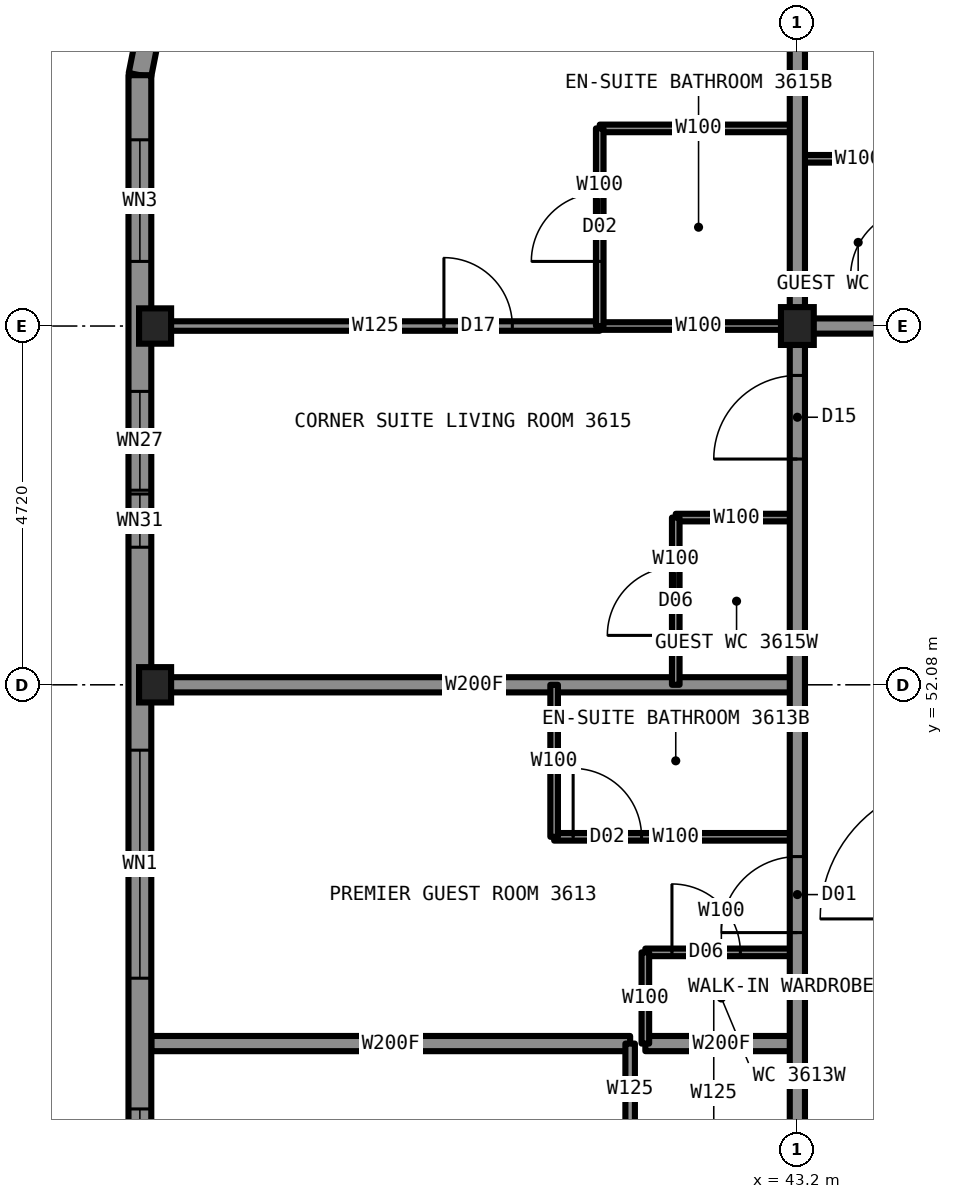
"""IFC4 building model, lengths in metres.
Left out: names, types, materials, properties, quantities, classifications, styles, units other than length and angle.
Written with IfcOpenShell. Run it as: python <this file> out.ifc"""

import sys

from ifc_helpers import new_model, si_unit, direction, frame, frame_2d, origin, origin_2d, place, context, subcontext, project, spatial, rectangle, i_section, extrude, element, fill, save


model = new_model("IFC4")
c1 = context("Model", 3, precision=1e-05, world=origin(), true_north=direction((0.0, 1.0)))
c2 = subcontext(c1, "Body", "Model", "MODEL_VIEW")
j1 = project(units=[si_unit("LENGTHUNIT", "METRE"), si_unit("PLANEANGLEUNIT", "RADIAN")], contexts=[c1])
p1 = place(None, origin())
s1 = spatial("IfcSite", under=j1, at=p1, CompositionType="ELEMENT")
p2 = place(p1, origin())
s2 = spatial("IfcBuilding", under=s1, at=p2, CompositionType="ELEMENT")
p3 = place(p2, frame((0.0, 0.0, 135.4)))
s3 = spatial("IfcBuildingStorey", under=s2, at=p3, CompositionType="ELEMENT", Elevation=135.4)
for number, where, z_axis, x_axis in (
    (1, (34.75, 52.08, 0.0), (0.0, 0.0, 1.0), (1.0, 0.0, 0.0)),
    (2, (34.75, 56.8, 0.0), (0.0, 0.0, 1.0), (1.0, 0.0, 0.0)),
):
    element("IfcColumn", number, at=place(p3, frame(where, z_axis=z_axis, x_axis=x_axis)), inside=s3, PredefinedType="COLUMN", context=c2, shape_type="SweptSolid", body=[
        extrude(i_section(OverallWidth=0.422, OverallDepth=0.465, WebThickness=0.045, FlangeThickness=0.073, at=origin_2d()), origin(), (0.0, 0.0, 1.0), 3.5),
    ])
p4 = place(p3, frame((43.2, 56.8, 0.0), z_axis=(0.0, 0.0, 1.0), x_axis=(1.0, 0.0, 0.0)))
e3 = element("IfcColumn", 3, at=p4, inside=s3, PredefinedType="COLUMN", context=c2, shape_type="SweptSolid", body=[
    extrude(i_section(OverallWidth=0.432, OverallDepth=0.498, WebThickness=0.056, FlangeThickness=0.089, at=origin_2d()), origin(), (0.0, 0.0, 1.0), 3.5),
])
p5 = place(p3, frame((40.6, 56.8, 0.0), z_axis=(0.0, 0.0, 1.0), x_axis=(1.0, 0.0, 0.0)))
e4 = element("IfcWall", 4, at=p5, inside=s3, PredefinedType="PARTITIONING", context=c2, shape_type="SweptSolid", body=[
    extrude(rectangle(XDim=2.6, YDim=0.1, at=frame_2d((1.3, 0.0))), origin(), (0.0, 0.0, 1.0), 2.573),
])
p6 = place(p3, frame((43.2, 56.8, 0.0), z_axis=(0.0, 0.0, 1.0), x_axis=(1.0, 0.0, 0.0)))
e5 = element("IfcWall", 5, at=p6, inside=s3, PredefinedType="PARTITIONING", context=c2, shape_type="SweptSolid", body=[
    extrude(rectangle(XDim=23.6, YDim=0.2, at=frame_2d((11.8, 0.0))), origin(), (0.0, 0.0, 1.0), 3.33),
])
p7 = place(p6, frame((1.85, 0.0, 0.0)))
e6 = element("IfcOpeningElement", 6, at=p7, cuts=e5, PredefinedType="OPENING", context=c2, shape_type="SweptSolid", body=[
    extrude(rectangle(XDim=1.1, YDim=2.2, at=frame_2d((0.55, 1.1))), frame((0.0, 0.11, 0.0), z_axis=(0.0, -1.0, 0.0), x_axis=(1.0, 0.0, 0.0)), (0.0, 0.0, 1.0), 0.22),
])
p8 = place(p6, frame((14.56, 0.0, 0.0)))
e7 = element("IfcOpeningElement", 7, at=p8, cuts=e5, PredefinedType="OPENING", context=c2, shape_type="SweptSolid", body=[
    extrude(rectangle(XDim=1.0, YDim=2.2, at=frame_2d((0.5, 1.1))), frame((0.0, 0.11, 0.0), z_axis=(0.0, -1.0, 0.0), x_axis=(1.0, 0.0, 0.0)), (0.0, 0.0, 1.0), 0.22),
])
p9 = place(p6, frame((21.14, 0.0, 0.0)))
e8 = element("IfcOpeningElement", 8, at=p9, cuts=e5, PredefinedType="OPENING", context=c2, shape_type="SweptSolid", body=[
    extrude(rectangle(XDim=1.0, YDim=2.2, at=frame_2d((0.5, 1.1))), frame((0.0, 0.11, 0.0), z_axis=(0.0, -1.0, 0.0), x_axis=(1.0, 0.0, 0.0)), (0.0, 0.0, 1.0), 0.22),
])
p10 = place(p3, frame((34.7, 56.8, 0.0), z_axis=(0.0, 0.0, 1.0), x_axis=(1.0, 0.0, 0.0)))
e9 = element("IfcWall", 9, at=p10, inside=s3, PredefinedType="PARTITIONING", context=c2, shape_type="SweptSolid", body=[
    extrude(rectangle(XDim=5.9, YDim=0.125, at=frame_2d((2.95, 0.0))), origin(), (0.0, 0.0, 1.0), 2.573),
])
p11 = place(p10, frame((3.85, 0.0, 0.0)))
e10 = element("IfcOpeningElement", 10, at=p11, cuts=e9, PredefinedType="OPENING", context=c2, shape_type="SweptSolid", body=[
    extrude(rectangle(XDim=0.9, YDim=2.2, at=frame_2d((0.45, 1.1))), frame((0.0, 0.073, 0.0), z_axis=(0.0, -1.0, 0.0), x_axis=(1.0, 0.0, 0.0)), (0.0, 0.0, 1.0), 0.145),
])
p12 = place(p3, frame((43.2, 59.0, 0.0), z_axis=(0.0, 0.0, 1.0), x_axis=(1.0, 0.0, 0.0)))
e11 = element("IfcWall", 11, at=p12, inside=s3, PredefinedType="PARTITIONING", context=c2, shape_type="SweptSolid", body=[
    extrude(rectangle(XDim=1.6, YDim=0.1, at=frame_2d((0.8, 0.0))), origin(), (0.0, 0.0, 1.0), 3.33),
])
p13 = place(p3, frame((40.6, 59.4, 0.0), z_axis=(0.0, 0.0, 1.0), x_axis=(1.0, 0.0, 0.0)))
e12 = element("IfcWall", 12, at=p13, inside=s3, PredefinedType="PARTITIONING", context=c2, shape_type="SweptSolid", body=[
    extrude(rectangle(XDim=2.6, YDim=0.1, at=frame_2d((1.3, 0.0))), origin(), (0.0, 0.0, 1.0), 3.33),
])
p14 = place(p3, frame((34.7, 47.36, 0.0), z_axis=(0.0, 0.0, 1.0), x_axis=(1.0, 0.0, 0.0)))
e13 = element("IfcWall", 13, at=p14, inside=s3, PredefinedType="PARTITIONING", context=c2, shape_type="SweptSolid", body=[
    extrude(rectangle(XDim=6.3, YDim=0.2, at=frame_2d((3.15, 0.0))), origin(), (0.0, 0.0, 1.0), 2.731),
])
p15 = place(p3, frame((41.2, 47.36, 0.0), z_axis=(0.0, 0.0, 1.0), x_axis=(1.0, 0.0, 0.0)))
e14 = element("IfcWall", 14, at=p15, inside=s3, PredefinedType="PARTITIONING", context=c2, shape_type="SweptSolid", body=[
    extrude(rectangle(XDim=2.0, YDim=0.2, at=frame_2d((1.0, 0.0))), origin(), (0.0, 0.0, 1.0), 2.731),
])
p16 = place(p3, frame((41.2, 48.56, 0.0), z_axis=(0.0, 0.0, 1.0), x_axis=(1.0, 0.0, 0.0)))
e15 = element("IfcWall", 15, at=p16, inside=s3, PredefinedType="PARTITIONING", context=c2, shape_type="SweptSolid", body=[
    extrude(rectangle(XDim=2.0, YDim=0.1, at=frame_2d((1.0, 0.0))), origin(), (0.0, 0.0, 1.0), 3.33),
])
p17 = place(p16, frame((0.35, 0.0, 0.0)))
e16 = element("IfcOpeningElement", 16, at=p17, cuts=e15, PredefinedType="OPENING", context=c2, shape_type="SweptSolid", body=[
    extrude(rectangle(XDim=0.9, YDim=2.1, at=frame_2d((0.45, 1.05))), frame((0.0, 0.06, 0.0), z_axis=(0.0, -1.0, 0.0), x_axis=(1.0, 0.0, 0.0)), (0.0, 0.0, 1.0), 0.12),
])
p18 = place(p3, frame((40.0, 50.08, 0.0), z_axis=(0.0, 0.0, 1.0), x_axis=(1.0, 0.0, 0.0)))
e17 = element("IfcWall", 17, at=p18, inside=s3, PredefinedType="PARTITIONING", context=c2, shape_type="SweptSolid", body=[
    extrude(rectangle(XDim=3.2, YDim=0.1, at=frame_2d((1.6, 0.0))), origin(), (0.0, 0.0, 1.0), 3.33),
])
p19 = place(p18, frame((0.25, 0.0, 0.0)))
e18 = element("IfcOpeningElement", 18, at=p19, cuts=e17, PredefinedType="OPENING", context=c2, shape_type="SweptSolid", body=[
    extrude(rectangle(XDim=0.9, YDim=2.1, at=frame_2d((0.45, 1.05))), frame((0.0, 0.06, 0.0), z_axis=(0.0, -1.0, 0.0), x_axis=(1.0, 0.0, 0.0)), (0.0, 0.0, 1.0), 0.12),
])
p20 = place(p3, frame((34.7, 52.08, 0.0), z_axis=(0.0, 0.0, 1.0), x_axis=(1.0, 0.0, 0.0)))
e19 = element("IfcWall", 19, at=p20, inside=s3, PredefinedType="PARTITIONING", context=c2, shape_type="SweptSolid", body=[
    extrude(rectangle(XDim=8.5, YDim=0.2, at=frame_2d((4.25, 0.0))), origin(), (0.0, 0.0, 1.0), 2.573),
])
p21 = place(p3, frame((41.6, 54.28, 0.0), z_axis=(0.0, 0.0, 1.0), x_axis=(1.0, 0.0, 0.0)))
e20 = element("IfcWall", 20, at=p21, inside=s3, PredefinedType="PARTITIONING", context=c2, shape_type="SweptSolid", body=[
    extrude(rectangle(XDim=1.6, YDim=0.1, at=frame_2d((0.8, 0.0))), origin(), (0.0, 0.0, 1.0), 3.33),
])
p22 = place(p3, frame((43.2, 33.2, 0.0), z_axis=(0.0, 0.0, 1.0), x_axis=(0.0, 1.0, 0.0)))
e21 = element("IfcWall", 21, at=p22, inside=s3, PredefinedType="PARTITIONING", context=c2, shape_type="SweptSolid", body=[
    extrude(rectangle(XDim=23.6, YDim=0.2, at=frame_2d((11.8, 0.0))), origin(), (0.0, 0.0, 1.0), 3.33),
])
p23 = place(p22, frame((6.98, 0.0, 0.0)))
e22 = element("IfcOpeningElement", 22, at=p23, cuts=e21, PredefinedType="OPENING", context=c2, shape_type="SweptSolid", body=[
    extrude(rectangle(XDim=1.0, YDim=2.2, at=frame_2d((0.5, 1.1))), frame((0.0, 0.11, 0.0), z_axis=(0.0, -1.0, 0.0), x_axis=(1.0, 0.0, 0.0)), (0.0, 0.0, 1.0), 0.22),
])
p24 = place(p22, frame((11.7, 0.0, 0.0)))
e23 = element("IfcOpeningElement", 23, at=p24, cuts=e21, PredefinedType="OPENING", context=c2, shape_type="SweptSolid", body=[
    extrude(rectangle(XDim=1.0, YDim=2.2, at=frame_2d((0.5, 1.1))), frame((0.0, 0.11, 0.0), z_axis=(0.0, -1.0, 0.0), x_axis=(1.0, 0.0, 0.0)), (0.0, 0.0, 1.0), 0.22),
])
p25 = place(p22, frame((15.62, 0.0, 0.0)))
e24 = element("IfcOpeningElement", 24, at=p25, cuts=e21, PredefinedType="OPENING", context=c2, shape_type="SweptSolid", body=[
    extrude(rectangle(XDim=1.0, YDim=2.2, at=frame_2d((0.5, 1.1))), frame((0.0, 0.11, 0.0), z_axis=(0.0, -1.0, 0.0), x_axis=(1.0, 0.0, 0.0)), (0.0, 0.0, 1.0), 0.22),
])
p26 = place(p22, frame((21.85, 0.0, 0.0)))
e25 = element("IfcOpeningElement", 25, at=p26, cuts=e21, PredefinedType="OPENING", context=c2, shape_type="SweptSolid", body=[
    extrude(rectangle(XDim=1.1, YDim=2.2, at=frame_2d((0.55, 1.1))), frame((0.0, 0.11, 0.0), z_axis=(0.0, -1.0, 0.0), x_axis=(1.0, 0.0, 0.0)), (0.0, 0.0, 1.0), 0.22),
])
p27 = place(p22, frame((0.65, 0.0, 0.0)))
e26 = element("IfcOpeningElement", 26, at=p27, cuts=e21, PredefinedType="OPENING", context=c2, shape_type="SweptSolid", body=[
    extrude(rectangle(XDim=1.1, YDim=2.2, at=frame_2d((0.55, 1.1))), frame((0.0, 0.11, 0.0), z_axis=(0.0, -1.0, 0.0), x_axis=(1.0, 0.0, 0.0)), (0.0, 0.0, 1.0), 0.22),
])
p28 = place(p3, frame((43.2, 56.8, 0.0), z_axis=(0.0, 0.0, 1.0), x_axis=(0.0, 1.0, 0.0)))
e27 = element("IfcWall", 27, at=p28, inside=s3, PredefinedType="PARTITIONING", context=c2, shape_type="SweptSolid", body=[
    extrude(rectangle(XDim=8.5, YDim=0.2, at=frame_2d((4.25, 0.0))), origin(), (0.0, 0.0, 1.0), 2.573),
])
p29 = place(p3, frame((41.6, 52.08, 0.0), z_axis=(0.0, 0.0, 1.0), x_axis=(0.0, 1.0, 0.0)))
e28 = element("IfcWall", 28, at=p29, inside=s3, PredefinedType="PARTITIONING", context=c2, shape_type="SweptSolid", body=[
    extrude(rectangle(XDim=2.2, YDim=0.1, at=frame_2d((1.1, 0.0))), origin(), (0.0, 0.0, 1.0), 3.33),
])
p30 = place(p29, frame((0.65, 0.0, 0.0)))
e29 = element("IfcOpeningElement", 29, at=p30, cuts=e28, PredefinedType="OPENING", context=c2, shape_type="SweptSolid", body=[
    extrude(rectangle(XDim=0.9, YDim=2.1, at=frame_2d((0.45, 1.05))), frame((0.0, 0.06, 0.0), z_axis=(0.0, -1.0, 0.0), x_axis=(1.0, 0.0, 0.0)), (0.0, 0.0, 1.0), 0.12),
])
p31 = place(p3, frame((41.2, 47.36, 0.0), z_axis=(0.0, 0.0, 1.0), x_axis=(0.0, 1.0, 0.0)))
e30 = element("IfcWall", 30, at=p31, inside=s3, PredefinedType="PARTITIONING", context=c2, shape_type="SweptSolid", body=[
    extrude(rectangle(XDim=1.2, YDim=0.1, at=frame_2d((0.6, 0.0))), origin(), (0.0, 0.0, 1.0), 3.33),
])
p32 = place(p3, frame((41.0, 46.16, 0.0), z_axis=(0.0, 0.0, 1.0), x_axis=(0.0, 1.0, 0.0)))
e31 = element("IfcWall", 31, at=p32, inside=s3, PredefinedType="PARTITIONING", context=c2, shape_type="SweptSolid", body=[
    extrude(rectangle(XDim=1.2, YDim=0.125, at=frame_2d((0.6, 0.0))), origin(), (0.0, 0.0, 1.0), 3.33),
])
p33 = place(p3, frame((40.6, 56.8, 0.0), z_axis=(0.0, 0.0, 1.0), x_axis=(0.0, 1.0, 0.0)))
e32 = element("IfcWall", 32, at=p33, inside=s3, PredefinedType="PARTITIONING", context=c2, shape_type="SweptSolid", body=[
    extrude(rectangle(XDim=2.6, YDim=0.1, at=frame_2d((1.3, 0.0))), origin(), (0.0, 0.0, 1.0), 3.33),
])
p34 = place(p33, frame((0.85, 0.0, 0.0)))
e33 = element("IfcOpeningElement", 33, at=p34, cuts=e32, PredefinedType="OPENING", context=c2, shape_type="SweptSolid", body=[
    extrude(rectangle(XDim=0.9, YDim=2.1, at=frame_2d((0.45, 1.05))), frame((0.0, 0.06, 0.0), z_axis=(0.0, -1.0, 0.0), x_axis=(1.0, 0.0, 0.0)), (0.0, 0.0, 1.0), 0.12),
])
p35 = place(p3, frame((40.0, 50.08, 0.0), z_axis=(0.0, 0.0, 1.0), x_axis=(0.0, 1.0, 0.0)))
e34 = element("IfcWall", 34, at=p35, inside=s3, PredefinedType="PARTITIONING", context=c2, shape_type="SweptSolid", body=[
    extrude(rectangle(XDim=2.0, YDim=0.1, at=frame_2d((1.0, 0.0))), origin(), (0.0, 0.0, 1.0), 3.33),
])
p36 = place(p3, frame((34.957, 62.147, 0.0), z_axis=(0.0, 0.0, 1.0), x_axis=(-0.195081421501, -0.980787050784, 0.0)))
e35 = element("IfcWall", 35, at=p36, inside=s3, PredefinedType="SOLIDWALL", context=c2, shape_type="SweptSolid", body=[
    extrude(rectangle(XDim=2.087, YDim=0.3, at=frame_2d((1.044, 0.0))), origin(), (0.0, 0.0, 1.0), 3.33),
])
p37 = place(p36, frame((0.444, 0.0, 0.5)))
e36 = element("IfcOpeningElement", 36, at=p37, cuts=e35, PredefinedType="OPENING", context=c2, shape_type="SweptSolid", body=[
    extrude(rectangle(XDim=1.2, YDim=2.0, at=frame_2d((0.6, 1.0))), frame((0.0, 0.16, 0.0), z_axis=(0.0, -1.0, 0.0), x_axis=(1.0, 0.0, 0.0)), (0.0, 0.0, 1.0), 0.32),
])
p38 = place(p3, frame((34.55, 60.1, 0.0), z_axis=(0.0, 0.0, 1.0), x_axis=(0.0, -1.0, 0.0)))
e37 = element("IfcWall", 37, at=p38, inside=s3, PredefinedType="SOLIDWALL", context=c2, shape_type="SweptSolid", body=[
    extrude(rectangle(XDim=30.2, YDim=0.3, at=frame_2d((15.1, 0.0))), origin(), (0.0, 0.0, 1.0), 2.83),
])
p39 = place(p38, frame((0.85, 0.0, 0.5)))
e38 = element("IfcOpeningElement", 38, at=p39, cuts=e37, PredefinedType="OPENING", context=c2, shape_type="SweptSolid", body=[
    extrude(rectangle(XDim=1.6, YDim=2.0, at=frame_2d((0.8, 1.0))), frame((0.0, 0.16, 0.0), z_axis=(0.0, -1.0, 0.0), x_axis=(1.0, 0.0, 0.0)), (0.0, 0.0, 1.0), 0.32),
])
p40 = place(p38, frame((4.16, 0.0, 0.5)))
e39 = element("IfcOpeningElement", 39, at=p40, cuts=e37, PredefinedType="OPENING", context=c2, shape_type="SweptSolid", body=[
    extrude(rectangle(XDim=1.3, YDim=1.9, at=frame_2d((0.65, 0.95))), frame((0.0, 0.16, 0.0), z_axis=(0.0, -1.0, 0.0), x_axis=(1.0, 0.0, 0.0)), (0.0, 0.0, 1.0), 0.32),
])
p41 = place(p38, frame((8.88, 0.0, 0.5)))
e40 = element("IfcOpeningElement", 40, at=p41, cuts=e37, PredefinedType="OPENING", context=c2, shape_type="SweptSolid", body=[
    extrude(rectangle(XDim=3.0, YDim=2.0, at=frame_2d((1.5, 1.0))), frame((0.0, 0.16, 0.0), z_axis=(0.0, -1.0, 0.0), x_axis=(1.0, 0.0, 0.0)), (0.0, 0.0, 1.0), 0.32),
])
p42 = place(p38, frame((13.6, 0.0, 0.5)))
e41 = element("IfcOpeningElement", 41, at=p42, cuts=e37, PredefinedType="OPENING", context=c2, shape_type="SweptSolid", body=[
    extrude(rectangle(XDim=3.0, YDim=2.0, at=frame_2d((1.5, 1.0))), frame((0.0, 0.16, 0.0), z_axis=(0.0, -1.0, 0.0), x_axis=(1.0, 0.0, 0.0)), (0.0, 0.0, 1.0), 0.32),
])
p43 = place(p38, frame((18.32, 0.0, 0.5)))
e42 = element("IfcOpeningElement", 42, at=p43, cuts=e37, PredefinedType="OPENING", context=c2, shape_type="SweptSolid", body=[
    extrude(rectangle(XDim=3.0, YDim=2.0, at=frame_2d((1.5, 1.0))), frame((0.0, 0.16, 0.0), z_axis=(0.0, -1.0, 0.0), x_axis=(1.0, 0.0, 0.0)), (0.0, 0.0, 1.0), 0.32),
])
p44 = place(p38, frame((24.69, 0.0, 0.5)))
e43 = element("IfcOpeningElement", 43, at=p44, cuts=e37, PredefinedType="OPENING", context=c2, shape_type="SweptSolid", body=[
    extrude(rectangle(XDim=1.3, YDim=1.9, at=frame_2d((0.65, 0.95))), frame((0.0, 0.16, 0.0), z_axis=(0.0, -1.0, 0.0), x_axis=(1.0, 0.0, 0.0)), (0.0, 0.0, 1.0), 0.32),
])
p45 = place(p38, frame((27.75, 0.0, 0.5)))
e44 = element("IfcOpeningElement", 44, at=p45, cuts=e37, PredefinedType="OPENING", context=c2, shape_type="SweptSolid", body=[
    extrude(rectangle(XDim=1.6, YDim=2.0, at=frame_2d((0.8, 1.0))), frame((0.0, 0.16, 0.0), z_axis=(0.0, -1.0, 0.0), x_axis=(1.0, 0.0, 0.0)), (0.0, 0.0, 1.0), 0.32),
])
p46 = place(p38, frame((5.51, 0.0, 0.5)))
e45 = element("IfcOpeningElement", 45, at=p46, cuts=e37, PredefinedType="OPENING", context=c2, shape_type="SweptSolid", body=[
    extrude(rectangle(XDim=0.7, YDim=0.9, at=frame_2d((0.35, 0.45))), frame((0.0, 0.16, 0.0), z_axis=(0.0, -1.0, 0.0), x_axis=(1.0, 0.0, 0.0)), (0.0, 0.0, 1.0), 0.32),
])
p47 = place(p38, frame((23.99, 0.0, 0.5)))
e46 = element("IfcOpeningElement", 46, at=p47, cuts=e37, PredefinedType="OPENING", context=c2, shape_type="SweptSolid", body=[
    extrude(rectangle(XDim=0.7, YDim=0.9, at=frame_2d((0.35, 0.45))), frame((0.0, 0.16, 0.0), z_axis=(0.0, -1.0, 0.0), x_axis=(1.0, 0.0, 0.0)), (0.0, 0.0, 1.0), 0.32),
])
p48 = place(p25, origin())
e47 = element("IfcDoor", 47, at=p48, inside=s3, OperationType="SINGLE_SWING_LEFT", PredefinedType="DOOR", context=c2, shape_type="SweptSolid", body=[
    extrude(rectangle(XDim=1.0, YDim=2.2, at=frame_2d((0.5, 1.1))), frame((0.0, 0.025, 0.0), z_axis=(0.0, -1.0, 0.0), x_axis=(1.0, 0.0, 0.0)), (0.0, 0.0, 1.0), 0.05),
])
fill(e24, e47)
p49 = place(p19, origin())
e48 = element("IfcDoor", 48, at=p49, inside=s3, OperationType="SINGLE_SWING_RIGHT", PredefinedType="DOOR", context=c2, shape_type="SweptSolid", body=[
    extrude(rectangle(XDim=0.9, YDim=2.1, at=frame_2d((0.45, 1.05))), frame((0.0, 0.025, 0.0), z_axis=(0.0, -1.0, 0.0), x_axis=(1.0, 0.0, 0.0)), (0.0, 0.0, 1.0), 0.05),
])
fill(e18, e48)
p50 = place(p17, origin())
e49 = element("IfcDoor", 49, at=p50, inside=s3, OperationType="SINGLE_SWING_LEFT", PredefinedType="DOOR", context=c2, shape_type="SweptSolid", body=[
    extrude(rectangle(XDim=0.9, YDim=2.1, at=frame_2d((0.45, 1.05))), frame((0.0, 0.025, 0.0), z_axis=(0.0, -1.0, 0.0), x_axis=(1.0, 0.0, 0.0)), (0.0, 0.0, 1.0), 0.05),
])
fill(e16, e49)
p51 = place(p26, origin())
e50 = element("IfcDoor", 50, at=p51, inside=s3, OperationType="SINGLE_SWING_LEFT", PredefinedType="DOOR", context=c2, shape_type="SweptSolid", body=[
    extrude(rectangle(XDim=1.1, YDim=2.2, at=frame_2d((0.55, 1.1))), frame((0.0, 0.025, 0.0), z_axis=(0.0, -1.0, 0.0), x_axis=(1.0, 0.0, 0.0)), (0.0, 0.0, 1.0), 0.05),
])
fill(e25, e50)
p52 = place(p34, origin())
e51 = element("IfcDoor", 51, at=p52, inside=s3, OperationType="SINGLE_SWING_RIGHT", PredefinedType="DOOR", context=c2, shape_type="SweptSolid", body=[
    extrude(rectangle(XDim=0.9, YDim=2.1, at=frame_2d((0.45, 1.05))), frame((0.0, 0.025, 0.0), z_axis=(0.0, -1.0, 0.0), x_axis=(1.0, 0.0, 0.0)), (0.0, 0.0, 1.0), 0.05),
])
fill(e33, e51)
p53 = place(p11, origin())
e52 = element("IfcDoor", 52, at=p53, inside=s3, OperationType="SINGLE_SWING_LEFT", PredefinedType="DOOR", context=c2, shape_type="SweptSolid", body=[
    extrude(rectangle(XDim=0.9, YDim=2.2, at=frame_2d((0.45, 1.1))), frame((0.0, 0.025, 0.0), z_axis=(0.0, -1.0, 0.0), x_axis=(1.0, 0.0, 0.0)), (0.0, 0.0, 1.0), 0.05),
])
fill(e10, e52)
p54 = place(p30, origin())
e53 = element("IfcDoor", 53, at=p54, inside=s3, OperationType="SINGLE_SWING_LEFT", PredefinedType="DOOR", context=c2, shape_type="SweptSolid", body=[
    extrude(rectangle(XDim=0.9, YDim=2.1, at=frame_2d((0.45, 1.05))), frame((0.0, 0.025, 0.0), z_axis=(0.0, -1.0, 0.0), x_axis=(1.0, 0.0, 0.0)), (0.0, 0.0, 1.0), 0.05),
])
fill(e29, e53)
p55 = place(p39, origin())
e54 = element("IfcWindow", 54, at=p55, inside=s3, PartitioningType="SINGLE_PANEL", PredefinedType="WINDOW", context=c2, shape_type="SweptSolid", body=[
    extrude(rectangle(XDim=1.6, YDim=2.0, at=frame_2d((0.8, 1.0))), frame((0.0, 0.03, 0.0), z_axis=(0.0, -1.0, 0.0), x_axis=(1.0, 0.0, 0.0)), (0.0, 0.0, 1.0), 0.06),
])
fill(e38, e54)
p56 = place(p40, origin())
e55 = element("IfcWindow", 55, at=p56, inside=s3, PartitioningType="SINGLE_PANEL", PredefinedType="WINDOW", context=c2, shape_type="SweptSolid", body=[
    extrude(rectangle(XDim=1.3, YDim=1.9, at=frame_2d((0.65, 0.95))), frame((0.0, 0.03, 0.0), z_axis=(0.0, -1.0, 0.0), x_axis=(1.0, 0.0, 0.0)), (0.0, 0.0, 1.0), 0.06),
])
fill(e39, e55)
p57 = place(p41, origin())
e56 = element("IfcWindow", 56, at=p57, inside=s3, PartitioningType="SINGLE_PANEL", PredefinedType="WINDOW", context=c2, shape_type="SweptSolid", body=[
    extrude(rectangle(XDim=3.0, YDim=2.0, at=frame_2d((1.5, 1.0))), frame((0.0, 0.03, 0.0), z_axis=(0.0, -1.0, 0.0), x_axis=(1.0, 0.0, 0.0)), (0.0, 0.0, 1.0), 0.06),
])
fill(e40, e56)
p58 = place(p42, origin())
e57 = element("IfcWindow", 57, at=p58, inside=s3, PartitioningType="SINGLE_PANEL", PredefinedType="WINDOW", context=c2, shape_type="SweptSolid", body=[
    extrude(rectangle(XDim=3.0, YDim=2.0, at=frame_2d((1.5, 1.0))), frame((0.0, 0.03, 0.0), z_axis=(0.0, -1.0, 0.0), x_axis=(1.0, 0.0, 0.0)), (0.0, 0.0, 1.0), 0.06),
])
fill(e41, e57)
p59 = place(p46, origin())
e58 = element("IfcWindow", 58, at=p59, inside=s3, PartitioningType="SINGLE_PANEL", PredefinedType="WINDOW", context=c2, shape_type="SweptSolid", body=[
    extrude(rectangle(XDim=0.7, YDim=0.9, at=frame_2d((0.35, 0.45))), frame((0.0, 0.03, 0.0), z_axis=(0.0, -1.0, 0.0), x_axis=(1.0, 0.0, 0.0)), (0.0, 0.0, 1.0), 0.06),
])
fill(e45, e58)
save(model, sys.argv[1])
